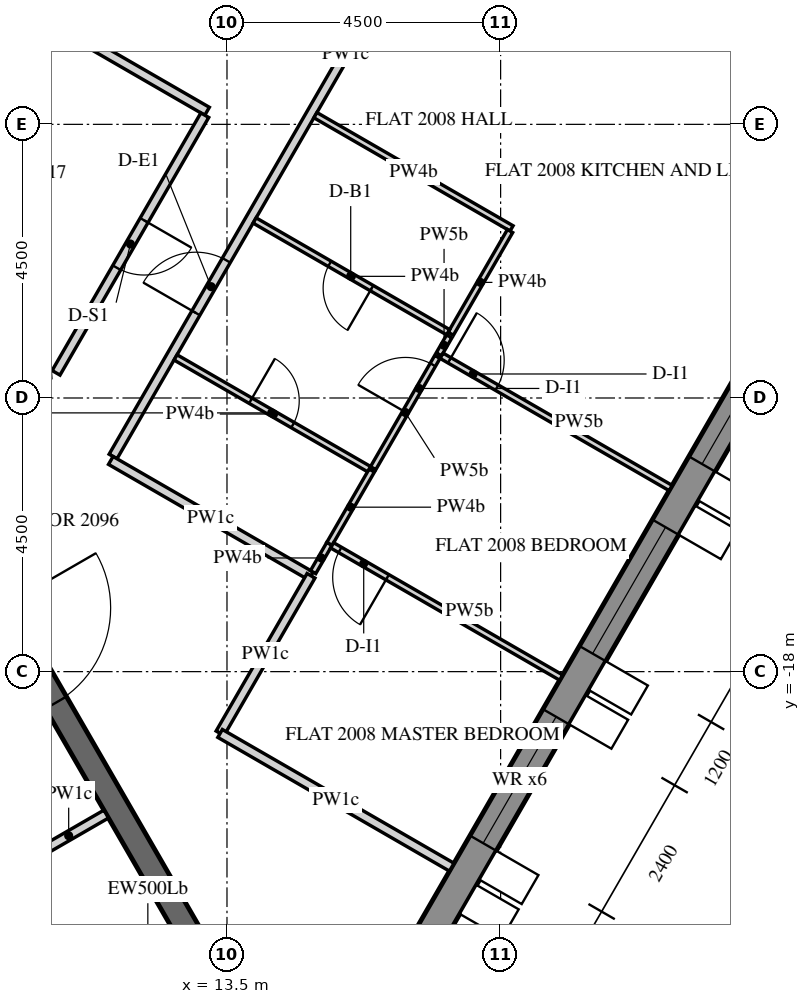
"""IFC4 building model, lengths in metres.
Left out: names, types, materials, properties, quantities, classifications, styles, units other than length and angle.
Written with IfcOpenShell. Run it as: python <this file> out.ifc"""

import sys

from ifc_helpers import new_model, si_unit, direction, frame, frame_2d, origin, place, context, subcontext, project, spatial, polyline, rectangle, outline, extrude, element, fill, save


model = new_model("IFC4")
c1 = context("Model", 3, precision=1e-05, world=origin(), true_north=direction((0.0, 1.0)))
c2 = subcontext(c1, "Body", "Model", "MODEL_VIEW")
j1 = project(units=[si_unit("LENGTHUNIT", "METRE"), si_unit("PLANEANGLEUNIT", "RADIAN")], contexts=[c1])
p1 = place(None, origin())
s1 = spatial("IfcSite", under=j1, at=p1, CompositionType="ELEMENT")
p2 = place(p1, origin())
s2 = spatial("IfcBuilding", under=s1, at=p2, CompositionType="ELEMENT")
p3 = place(p2, frame((0.0, 0.0, 256.2)))
s3 = spatial("IfcBuildingStorey", under=s2, at=p3, CompositionType="ELEMENT", Elevation=256.2)
p4 = place(p3, frame((16.451, -23.005, 0.0), z_axis=(0.0, 0.0, 1.0), x_axis=(0.500003737743, 0.866023245787, 0.0)))
e1 = element("IfcWall", 1, at=p4, inside=s3, PredefinedType="SOLIDWALL", context=c2, shape_type="SweptSolid", body=[
    extrude(outline(polyline([(-0.021, -0.25), (25.468, -0.25), (25.421, 0.25), (0.021, 0.25), (-0.021, -0.25)])), origin(), (0.0, 0.0, 1.0), 3.75),
])
p5 = place(p4, frame((2.522, 0.0, 0.6)))
e2 = element("IfcOpeningElement", 2, at=p5, cuts=e1, PredefinedType="OPENING", context=c2, shape_type="SweptSolid", body=[
    extrude(rectangle(XDim=2.4, YDim=2.7, at=frame_2d((1.2, 1.35))), frame((0.0, 0.26, 0.0), z_axis=(0.0, -1.0, 0.0), x_axis=(1.0, 0.0, 0.0)), (0.0, 0.0, 1.0), 0.52),
])
p6 = place(p4, frame((6.122, 0.0, 0.6)))
e3 = element("IfcOpeningElement", 3, at=p6, cuts=e1, PredefinedType="OPENING", context=c2, shape_type="SweptSolid", body=[
    extrude(rectangle(XDim=2.4, YDim=2.7, at=frame_2d((1.2, 1.35))), frame((0.0, 0.26, 0.0), z_axis=(0.0, -1.0, 0.0), x_axis=(1.0, 0.0, 0.0)), (0.0, 0.0, 1.0), 0.52),
])
p7 = place(p4, frame((9.722, 0.0, 0.6)))
e4 = element("IfcOpeningElement", 4, at=p7, cuts=e1, PredefinedType="OPENING", context=c2, shape_type="SweptSolid", body=[
    extrude(rectangle(XDim=2.4, YDim=2.7, at=frame_2d((1.2, 1.35))), frame((0.0, 0.26, 0.0), z_axis=(0.0, -1.0, 0.0), x_axis=(1.0, 0.0, 0.0)), (0.0, 0.0, 1.0), 0.52),
])
p8 = place(p4, frame((13.323, 0.0, 0.6)))
e5 = element("IfcOpeningElement", 5, at=p8, cuts=e1, PredefinedType="OPENING", context=c2, shape_type="SweptSolid", body=[
    extrude(rectangle(XDim=2.4, YDim=2.7, at=frame_2d((1.2, 1.35))), frame((0.0, 0.26, 0.0), z_axis=(0.0, -1.0, 0.0), x_axis=(1.0, 0.0, 0.0)), (0.0, 0.0, 1.0), 0.52),
])
p9 = place(p4, frame((16.922, 0.0, 0.6)))
e6 = element("IfcOpeningElement", 6, at=p9, cuts=e1, PredefinedType="OPENING", context=c2, shape_type="SweptSolid", body=[
    extrude(rectangle(XDim=2.4, YDim=2.7, at=frame_2d((1.2, 1.35))), frame((0.0, 0.26, 0.0), z_axis=(0.0, -1.0, 0.0), x_axis=(1.0, 0.0, 0.0)), (0.0, 0.0, 1.0), 0.52),
])
p10 = place(p4, frame((20.522, 0.0, 0.6)))
e7 = element("IfcOpeningElement", 7, at=p10, cuts=e1, PredefinedType="OPENING", context=c2, shape_type="SweptSolid", body=[
    extrude(rectangle(XDim=2.4, YDim=2.7, at=frame_2d((1.2, 1.35))), frame((0.0, 0.26, 0.0), z_axis=(0.0, -1.0, 0.0), x_axis=(1.0, 0.0, 0.0)), (0.0, 0.0, 1.0), 0.52),
])
p11 = place(p3, frame((6.235, -10.8, 0.0), z_axis=(0.0, 0.0, 1.0), x_axis=(0.499996419489, 0.866027470984, 0.0)))
e8 = element("IfcWall", 8, at=p11, inside=s3, PredefinedType="SHEAR", context=c2, shape_type="SweptSolid", body=[
    extrude(outline(polyline([(-0.115, -0.2), (12.586, -0.2), (12.355, 0.2), (0.115, 0.2), (-0.115, -0.2)])), origin(), (0.0, 0.0, 1.0), 3.75),
])
p12 = place(p11, frame((5.364, 0.0, 0.0)))
e9 = element("IfcOpeningElement", 9, at=p12, cuts=e8, PredefinedType="OPENING", context=c2, shape_type="SweptSolid", body=[
    extrude(rectangle(XDim=1.8, YDim=2.4, at=frame_2d((0.9, 1.2))), frame((0.0, 0.21, 0.0), z_axis=(0.0, -1.0, 0.0), x_axis=(1.0, 0.0, 0.0)), (0.0, 0.0, 1.0), 0.42),
])
p13 = place(p3, frame((6.351, -11.0, 0.0), z_axis=(0.0, 0.0, 1.0), x_axis=(0.499998894578, -0.866026041999, 0.0)))
e10 = element("IfcWall", 10, at=p13, inside=s3, PredefinedType="SHEAR", context=c2, shape_type="SweptSolid", body=[
    extrude(rectangle(XDim=15.544, YDim=0.4, at=frame_2d((7.772, 0.0))), origin(), (0.0, 0.0, 1.0), 3.75),
])
p14 = place(p13, frame((6.872, 0.0, 0.0)))
e11 = element("IfcOpeningElement", 11, at=p14, cuts=e10, PredefinedType="OPENING", context=c2, shape_type="SweptSolid", body=[
    extrude(rectangle(XDim=1.8, YDim=2.4, at=frame_2d((0.9, 1.2))), frame((0.0, 0.21, 0.0), z_axis=(0.0, -1.0, 0.0), x_axis=(1.0, 0.0, 0.0)), (0.0, 0.0, 1.0), 0.42),
])
p15 = place(p3, frame((10.28, -21.055, 0.0), z_axis=(0.0, 0.0, 1.0), x_axis=(0.866020080793, 0.500009219579, 0.0)))
e12 = element("IfcWall", 12, at=p15, inside=s3, PredefinedType="PARTITIONING", context=c2, shape_type="SweptSolid", body=[
    extrude(rectangle(XDim=1.425, YDim=0.15, at=frame_2d((0.712, 0.0))), origin(), (0.0, 0.0, 1.0), 2.823),
])
p16 = place(p3, frame((11.627, -14.462, 0.0), z_axis=(0.0, 0.0, 1.0), x_axis=(0.499994634027, 0.866028501808, 0.0)))
e13 = element("IfcWall", 13, at=p16, inside=s3, PredefinedType="PARTITIONING", context=c2, shape_type="SweptSolid", body=[
    extrude(rectangle(XDim=15.296, YDim=0.15, at=frame_2d((7.648, 0.0))), origin(), (0.0, 0.0, 1.0), 2.823),
])
p17 = place(p16, frame((2.725, 0.0, 0.0)))
e14 = element("IfcOpeningElement", 14, at=p17, cuts=e13, PredefinedType="OPENING", context=c2, shape_type="SweptSolid", body=[
    extrude(rectangle(XDim=1.0, YDim=2.1, at=frame_2d((0.5, 1.05))), frame((0.0, 0.085, 0.0), z_axis=(0.0, -1.0, 0.0), x_axis=(1.0, 0.0, 0.0)), (0.0, 0.0, 1.0), 0.17),
])
p18 = place(p16, frame((13.936, 0.0, 0.0)))
e15 = element("IfcOpeningElement", 15, at=p18, cuts=e13, PredefinedType="OPENING", context=c2, shape_type="SweptSolid", body=[
    extrude(rectangle(XDim=1.0, YDim=2.1, at=frame_2d((0.5, 1.05))), frame((0.0, 0.085, 0.0), z_axis=(0.0, -1.0, 0.0), x_axis=(1.0, 0.0, 0.0)), (0.0, 0.0, 1.0), 0.17),
])
p19 = place(p3, frame((14.88, -16.427, 0.0), z_axis=(0.0, 0.0, 1.0), x_axis=(-0.86601654697, 0.500015340139, 0.0)))
e16 = element("IfcWall", 16, at=p19, inside=s3, PredefinedType="PARTITIONING", context=c2, shape_type="SweptSolid", body=[
    extrude(rectangle(XDim=3.8, YDim=0.15, at=frame_2d((1.9, 0.0))), origin(), (0.0, 0.0, 1.0), 2.823),
])
p20 = place(p3, frame((13.386, -19.014, 0.0), z_axis=(0.0, 0.0, 1.0), x_axis=(0.500009728207, 0.866019787128, 0.0)))
e17 = element("IfcWall", 17, at=p20, inside=s3, PredefinedType="PARTITIONING", context=c2, shape_type="SweptSolid", body=[
    extrude(rectangle(XDim=2.992, YDim=0.15, at=frame_2d((1.496, 0.0))), origin(), (0.0, 0.0, 1.0), 2.823),
])
p21 = place(p3, frame((17.196, -21.216, 0.0), z_axis=(0.0, 0.0, 1.0), x_axis=(-0.866010893236, 0.500025132165, 0.0)))
e18 = element("IfcWall", 18, at=p21, inside=s3, PredefinedType="PARTITIONING", context=c2, shape_type="SweptSolid", body=[
    extrude(rectangle(XDim=4.399, YDim=0.15, at=frame_2d((2.199, 0.0))), origin(), (0.0, 0.0, 1.0), 2.823),
])
p22 = place(p3, frame((9.016, -6.384, 0.0), z_axis=(0.0, 0.0, 1.0), x_axis=(0.866015339567, -0.500017431331, 0.0)))
e19 = element("IfcWall", 19, at=p22, inside=s3, PredefinedType="PARTITIONING", context=c2, shape_type="SweptSolid", body=[
    extrude(rectangle(XDim=4.8, YDim=0.15, at=frame_2d((2.4, 0.0))), origin(), (0.0, 0.0, 1.0), 2.823),
])
p23 = place(p3, frame((13.135, -8.849, 0.0), z_axis=(0.0, 0.0, 1.0), x_axis=(-0.500024829938, -0.866011067739, 0.0)))
e20 = element("IfcWall", 20, at=p23, inside=s3, PredefinedType="PARTITIONING", context=c2, shape_type="SweptSolid", body=[
    extrude(rectangle(XDim=4.892, YDim=0.15, at=frame_2d((2.446, 0.0))), origin(), (0.0, 0.0, 1.0), 2.823),
])
p24 = place(p23, frame((1.996, 0.0, 0.0)))
e21 = element("IfcOpeningElement", 21, at=p24, cuts=e20, PredefinedType="OPENING", context=c2, shape_type="SweptSolid", body=[
    extrude(rectangle(XDim=0.9, YDim=2.1, at=frame_2d((0.45, 1.05))), frame((0.0, 0.085, 0.0), z_axis=(0.0, -1.0, 0.0), x_axis=(1.0, 0.0, 0.0)), (0.0, 0.0, 1.0), 0.17),
])
p25 = place(p3, frame((17.155, -12.487, 0.0), z_axis=(0.0, 0.0, 1.0), x_axis=(-0.499681137129, -0.866209421097, 0.0)))
e22 = element("IfcWall", 22, at=p25, inside=s3, PredefinedType="PARTITIONING", context=c2, shape_type="SweptSolid", body=[
    extrude(rectangle(XDim=0.341, YDim=0.1, at=frame_2d((0.17, 0.0))), origin(), (0.0, 0.0, 1.0), 2.823),
])
p26 = place(p3, frame((17.029, -12.805, 0.0), z_axis=(0.0, 0.0, 1.0), x_axis=(0.866027639635, -0.499996127374, 0.0)))
e23 = element("IfcWall", 23, at=p26, inside=s3, PredefinedType="PARTITIONING", context=c2, shape_type="SweptSolid", body=[
    extrude(rectangle(XDim=4.35, YDim=0.1, at=frame_2d((2.175, 0.0))), origin(), (0.0, 0.0, 1.0), 2.823),
])
p27 = place(p26, frame((0.15, 0.0, 0.0)))
e24 = element("IfcOpeningElement", 24, at=p27, cuts=e23, PredefinedType="OPENING", context=c2, shape_type="SweptSolid", body=[
    extrude(rectangle(XDim=0.9, YDim=2.1, at=frame_2d((0.45, 1.05))), frame((0.0, 0.06, 0.0), z_axis=(0.0, -1.0, 0.0), x_axis=(1.0, 0.0, 0.0)), (0.0, 0.0, 1.0), 0.12),
])
p28 = place(p3, frame((14.954, -8.849, 0.0), z_axis=(0.0, 0.0, 1.0), x_axis=(0.866028424924, -0.499994767197, 0.0)))
e25 = element("IfcWall", 25, at=p28, inside=s3, PredefinedType="PARTITIONING", context=c2, shape_type="SweptSolid", body=[
    extrude(rectangle(XDim=3.725, YDim=0.1, at=frame_2d((1.863, 0.0))), origin(), (0.0, 0.0, 1.0), 2.823),
])
p29 = place(p3, frame((18.155, -10.754, 0.0), z_axis=(0.0, 0.0, 1.0), x_axis=(-0.49989585183, -0.866085525409, 0.0)))
e26 = element("IfcWall", 26, at=p29, inside=s3, PredefinedType="PARTITIONING", context=c2, shape_type="SweptSolid", body=[
    extrude(rectangle(XDim=1.95, YDim=0.1, at=frame_2d((0.975, 0.0))), origin(), (0.0, 0.0, 1.0), 2.823),
])
p30 = place(p3, frame((24.396, -8.745, 0.0), z_axis=(0.0, 0.0, 1.0), x_axis=(-0.866022959057, 0.500004234368, 0.0)))
e27 = element("IfcWall", 27, at=p30, inside=s3, PredefinedType="PARTITIONING", context=c2, shape_type="SweptSolid", body=[
    extrude(rectangle(XDim=8.125, YDim=0.18, at=frame_2d((4.062, 0.0))), origin(), (0.0, 0.0, 1.0), 2.823),
])
p31 = place(p3, frame((12.654, -12.833, 0.0), z_axis=(0.0, 0.0, 1.0), x_axis=(0.866056803351, -0.499945610411, 0.0)))
e28 = element("IfcWall", 28, at=p31, inside=s3, PredefinedType="PARTITIONING", context=c2, shape_type="SweptSolid", body=[
    extrude(rectangle(XDim=3.725, YDim=0.1, at=frame_2d((1.863, 0.0))), origin(), (0.0, 0.0, 1.0), 2.823),
])
p32 = place(p31, frame((1.425, 0.0, 0.0)))
e29 = element("IfcOpeningElement", 29, at=p32, cuts=e28, PredefinedType="OPENING", context=c2, shape_type="SweptSolid", body=[
    extrude(rectangle(XDim=0.8, YDim=2.1, at=frame_2d((0.4, 1.05))), frame((0.0, 0.06, 0.0), z_axis=(0.0, -1.0, 0.0), x_axis=(1.0, 0.0, 0.0)), (0.0, 0.0, 1.0), 0.12),
])
p33 = place(p3, frame((15.904, -14.653, 0.0), z_axis=(0.0, 0.0, 1.0), x_axis=(0.499979177903, 0.866037425094, 0.0)))
e30 = element("IfcWall", 30, at=p33, inside=s3, PredefinedType="PARTITIONING", context=c2, shape_type="SweptSolid", body=[
    extrude(rectangle(XDim=2.113, YDim=0.1, at=frame_2d((1.056, 0.0))), origin(), (0.0, 0.0, 1.0), 2.823),
])
p34 = place(p33, frame((1.063, 0.0, 0.0)))
e31 = element("IfcOpeningElement", 31, at=p34, cuts=e30, PredefinedType="OPENING", context=c2, shape_type="SweptSolid", body=[
    extrude(rectangle(XDim=0.9, YDim=2.1, at=frame_2d((0.45, 1.05))), frame((0.0, 0.06, 0.0), z_axis=(0.0, -1.0, 0.0), x_axis=(1.0, 0.0, 0.0)), (0.0, 0.0, 1.0), 0.12),
])
p35 = place(p3, frame((17.137, -12.418, 0.0), z_axis=(0.0, 0.0, 1.0), x_axis=(-0.866035129944, 0.499983153418, 0.0)))
e32 = element("IfcWall", 32, at=p35, inside=s3, PredefinedType="PARTITIONING", context=c2, shape_type="SweptSolid", body=[
    extrude(rectangle(XDim=3.675, YDim=0.1, at=frame_2d((1.837, 0.0))), origin(), (0.0, 0.0, 1.0), 2.823),
])
p36 = place(p35, frame((1.45, 0.0, 0.0)))
e33 = element("IfcOpeningElement", 33, at=p36, cuts=e32, PredefinedType="OPENING", context=c2, shape_type="SweptSolid", body=[
    extrude(rectangle(XDim=0.8, YDim=2.1, at=frame_2d((0.4, 1.05))), frame((0.0, 0.06, 0.0), z_axis=(0.0, -1.0, 0.0), x_axis=(1.0, 0.0, 0.0)), (0.0, 0.0, 1.0), 0.12),
])
p37 = place(p3, frame((14.917, -16.364, 0.0), z_axis=(0.0, 0.0, 1.0), x_axis=(0.500141487433, 0.865943700565, 0.0)))
e34 = element("IfcWall", 34, at=p37, inside=s3, PredefinedType="PARTITIONING", context=c2, shape_type="SweptSolid", body=[
    extrude(rectangle(XDim=0.538, YDim=0.1, at=frame_2d((0.269, 0.0))), origin(), (0.0, 0.0, 1.0), 2.823),
])
p38 = place(p3, frame((15.186, -15.898, 0.0), z_axis=(0.0, 0.0, 1.0), x_axis=(0.4999705729, 0.866042392862, 0.0)))
e35 = element("IfcWall", 35, at=p38, inside=s3, PredefinedType="PARTITIONING", context=c2, shape_type="SweptSolid", body=[
    extrude(rectangle(XDim=1.391, YDim=0.1, at=frame_2d((0.696, 0.0))), origin(), (0.0, 0.0, 1.0), 2.823),
])
p39 = place(p3, frame((18.996, -18.098, 0.0), z_axis=(0.0, 0.0, 1.0), x_axis=(-0.866027639635, 0.499996127374, 0.0)))
e36 = element("IfcWall", 36, at=p39, inside=s3, PredefinedType="PARTITIONING", context=c2, shape_type="SweptSolid", body=[
    extrude(rectangle(XDim=4.35, YDim=0.1, at=frame_2d((2.175, 0.0))), origin(), (0.0, 0.0, 1.0), 2.823),
])
p40 = place(p39, frame((3.3, 0.0, 0.0)))
e37 = element("IfcOpeningElement", 37, at=p40, cuts=e36, PredefinedType="OPENING", context=c2, shape_type="SweptSolid", body=[
    extrude(rectangle(XDim=0.9, YDim=2.1, at=frame_2d((0.45, 1.05))), frame((0.0, 0.06, 0.0), z_axis=(0.0, -1.0, 0.0), x_axis=(1.0, 0.0, 0.0)), (0.0, 0.0, 1.0), 0.12),
])
p41 = place(p5, frame((0.0, 0.18, 0.0)))
e38 = element("IfcWindow", 38, at=p41, inside=s3, PartitioningType="DOUBLE_PANEL_VERTICAL", PredefinedType="WINDOW", context=c2, shape_type="SweptSolid", body=[
    extrude(rectangle(XDim=2.4, YDim=2.7, at=frame_2d((1.2, 1.35))), frame((0.0, 0.03, 0.0), z_axis=(0.0, -1.0, 0.0), x_axis=(1.0, 0.0, 0.0)), (0.0, 0.0, 1.0), 0.06),
])
fill(e2, e38)
p42 = place(p6, frame((0.0, 0.18, 0.0)))
e39 = element("IfcWindow", 39, at=p42, inside=s3, PartitioningType="DOUBLE_PANEL_VERTICAL", PredefinedType="WINDOW", context=c2, shape_type="SweptSolid", body=[
    extrude(rectangle(XDim=2.4, YDim=2.7, at=frame_2d((1.2, 1.35))), frame((0.0, 0.03, 0.0), z_axis=(0.0, -1.0, 0.0), x_axis=(1.0, 0.0, 0.0)), (0.0, 0.0, 1.0), 0.06),
])
fill(e3, e39)
p43 = place(p7, frame((0.0, 0.18, 0.0)))
e40 = element("IfcWindow", 40, at=p43, inside=s3, PartitioningType="DOUBLE_PANEL_VERTICAL", PredefinedType="WINDOW", context=c2, shape_type="SweptSolid", body=[
    extrude(rectangle(XDim=2.4, YDim=2.7, at=frame_2d((1.2, 1.35))), frame((0.0, 0.03, 0.0), z_axis=(0.0, -1.0, 0.0), x_axis=(1.0, 0.0, 0.0)), (0.0, 0.0, 1.0), 0.06),
])
fill(e4, e40)
p44 = place(p14, origin())
e41 = element("IfcDoor", 41, at=p44, inside=s3, OperationType="DOUBLE_DOOR_SINGLE_SWING", PredefinedType="DOOR", context=c2, shape_type="SweptSolid", body=[
    extrude(rectangle(XDim=1.8, YDim=2.4, at=frame_2d((0.9, 1.2))), frame((0.0, 0.025, 0.0), z_axis=(0.0, -1.0, 0.0), x_axis=(1.0, 0.0, 0.0)), (0.0, 0.0, 1.0), 0.05),
])
fill(e11, e41)
p45 = place(p17, origin())
e42 = element("IfcDoor", 42, at=p45, inside=s3, OperationType="SINGLE_SWING_LEFT", PredefinedType="DOOR", context=c2, shape_type="SweptSolid", body=[
    extrude(rectangle(XDim=1.0, YDim=2.1, at=frame_2d((0.5, 1.05))), frame((0.0, 0.025, 0.0), z_axis=(0.0, -1.0, 0.0), x_axis=(1.0, 0.0, 0.0)), (0.0, 0.0, 1.0), 0.05),
])
fill(e14, e42)
p46 = place(p32, origin())
e43 = element("IfcDoor", 43, at=p46, inside=s3, OperationType="SINGLE_SWING_RIGHT", PredefinedType="DOOR", context=c2, shape_type="SweptSolid", body=[
    extrude(rectangle(XDim=0.8, YDim=2.1, at=frame_2d((0.4, 1.05))), frame((0.0, 0.025, 0.0), z_axis=(0.0, -1.0, 0.0), x_axis=(1.0, 0.0, 0.0)), (0.0, 0.0, 1.0), 0.05),
])
fill(e29, e43)
p47 = place(p34, origin())
e44 = element("IfcDoor", 44, at=p47, inside=s3, OperationType="SINGLE_SWING_RIGHT", PredefinedType="DOOR", context=c2, shape_type="SweptSolid", body=[
    extrude(rectangle(XDim=0.9, YDim=2.1, at=frame_2d((0.45, 1.05))), frame((0.0, 0.025, 0.0), z_axis=(0.0, -1.0, 0.0), x_axis=(1.0, 0.0, 0.0)), (0.0, 0.0, 1.0), 0.05),
])
fill(e31, e44)
p48 = place(p40, origin())
e45 = element("IfcDoor", 45, at=p48, inside=s3, OperationType="SINGLE_SWING_RIGHT", PredefinedType="DOOR", context=c2, shape_type="SweptSolid", body=[
    extrude(rectangle(XDim=0.9, YDim=2.1, at=frame_2d((0.45, 1.05))), frame((0.0, 0.025, 0.0), z_axis=(0.0, -1.0, 0.0), x_axis=(1.0, 0.0, 0.0)), (0.0, 0.0, 1.0), 0.05),
])
fill(e37, e45)
p49 = place(p27, origin())
e46 = element("IfcDoor", 46, at=p49, inside=s3, OperationType="SINGLE_SWING_RIGHT", PredefinedType="DOOR", context=c2, shape_type="SweptSolid", body=[
    extrude(rectangle(XDim=0.9, YDim=2.1, at=frame_2d((0.45, 1.05))), frame((0.0, 0.025, 0.0), z_axis=(0.0, -1.0, 0.0), x_axis=(1.0, 0.0, 0.0)), (0.0, 0.0, 1.0), 0.05),
])
fill(e24, e46)
p50 = place(p36, origin())
e47 = element("IfcDoor", 47, at=p50, inside=s3, OperationType="SINGLE_SWING_RIGHT", PredefinedType="DOOR", context=c2, shape_type="SweptSolid", body=[
    extrude(rectangle(XDim=0.8, YDim=2.1, at=frame_2d((0.4, 1.05))), frame((0.0, 0.025, 0.0), z_axis=(0.0, -1.0, 0.0), x_axis=(1.0, 0.0, 0.0)), (0.0, 0.0, 1.0), 0.05),
])
fill(e33, e47)
p51 = place(p24, origin())
e48 = element("IfcDoor", 48, at=p51, inside=s3, OperationType="SINGLE_SWING_LEFT", PredefinedType="DOOR", context=c2, shape_type="SweptSolid", body=[
    extrude(rectangle(XDim=0.9, YDim=2.1, at=frame_2d((0.45, 1.05))), frame((0.0, 0.025, 0.0), z_axis=(0.0, -1.0, 0.0), x_axis=(1.0, 0.0, 0.0)), (0.0, 0.0, 1.0), 0.05),
])
fill(e21, e48)
save(model, sys.argv[1])
